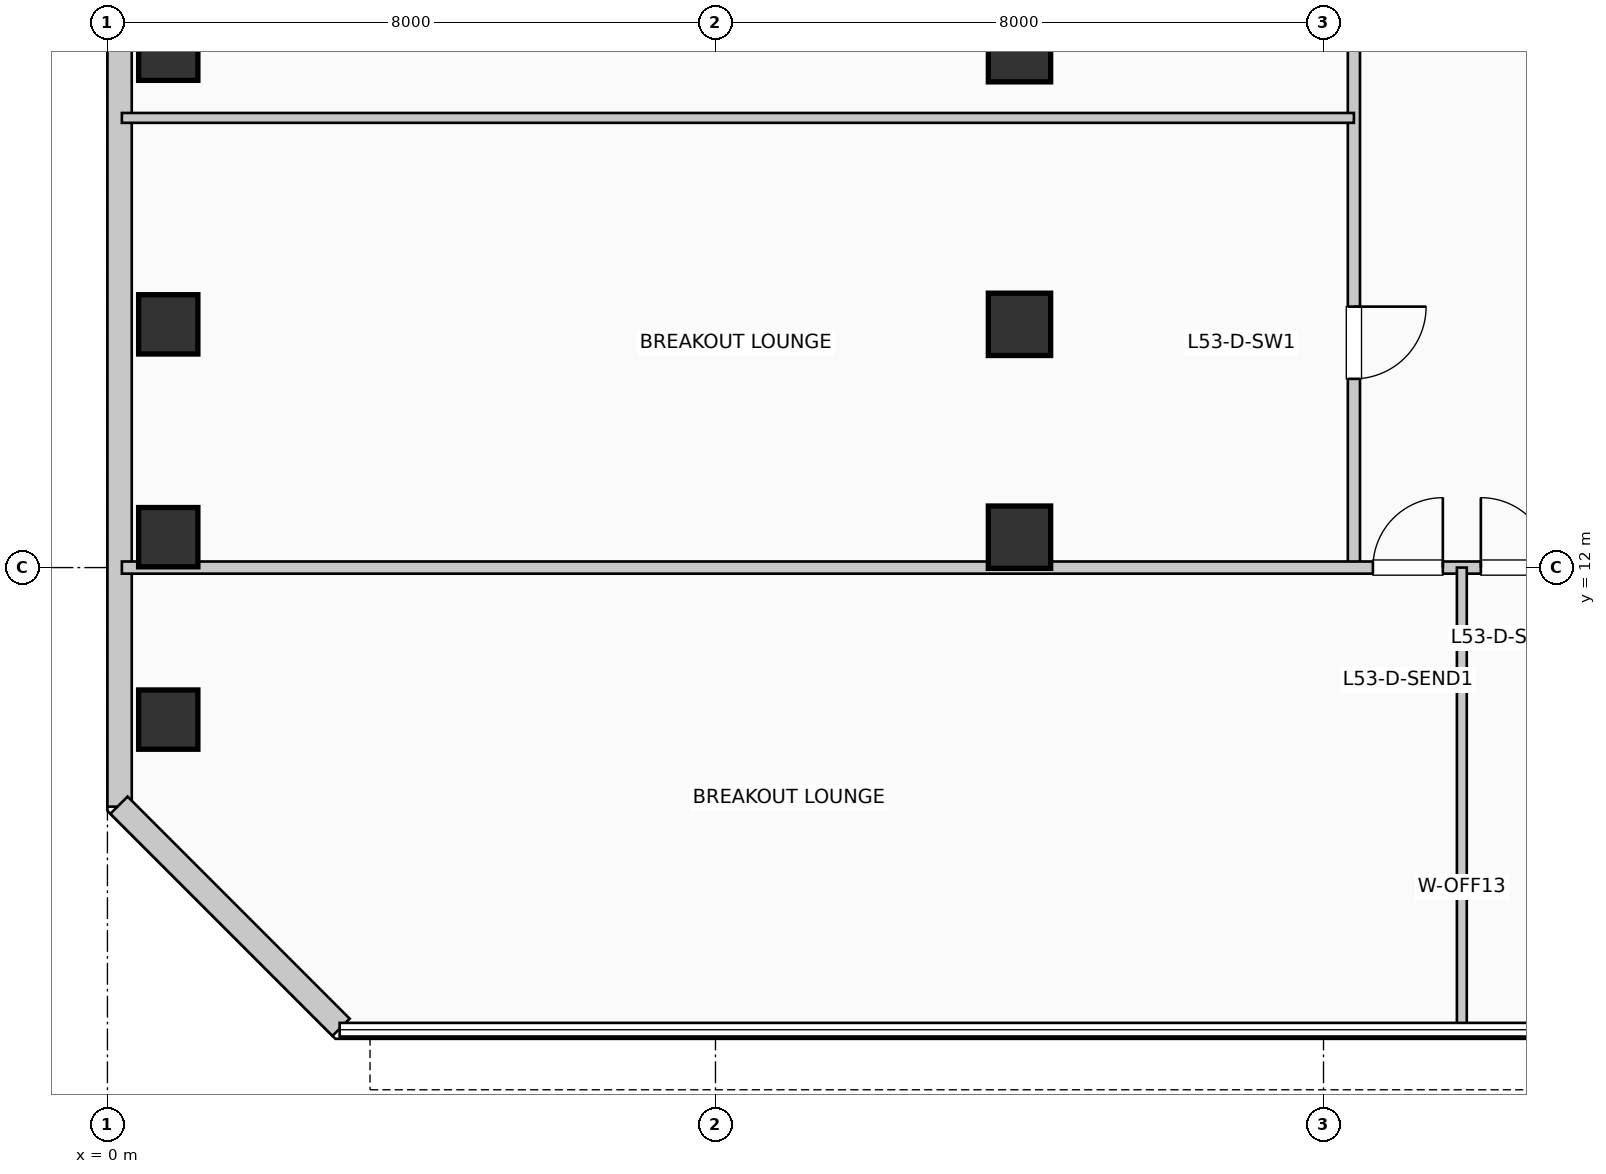
"""IFC4 building model, lengths in metres.
Left out: names, types, materials, properties, quantities, classifications, styles, units other than length and angle.
Written with IfcOpenShell. Run it as: python <this file> out.ifc"""

import sys

from ifc_helpers import new_model, si_unit, direction, frame, frame_2d, origin, origin_2d, place, context, subcontext, project, spatial, rectangle, extrude, element, fill, save


model = new_model("IFC4")
c1 = context("Model", 3, precision=1e-05, world=origin(), true_north=direction((0.0, 1.0)))
c2 = subcontext(c1, "Body", "Model", "MODEL_VIEW")
j1 = project(units=[si_unit("LENGTHUNIT", "METRE"), si_unit("PLANEANGLEUNIT", "RADIAN")], contexts=[c1])
p1 = place(None, origin())
s1 = spatial("IfcSite", under=j1, at=p1, CompositionType="ELEMENT")
p2 = place(p1, origin())
s2 = spatial("IfcBuilding", under=s1, at=p2, CompositionType="ELEMENT")
p3 = place(p2, frame((0.0, 0.0, 219.78)))
s3 = spatial("IfcBuildingStorey", under=s2, at=p3, CompositionType="ELEMENT", Elevation=219.78)
for number, where, z_axis, x_axis in (
    (1, (0.8, 10.0, 0.0), (0.0, 0.0, 1.0), (1.0, 0.0, 0.0)),
    (2, (0.8, 12.4, 0.0), (0.0, 0.0, 1.0), (1.0, 0.0, 0.0)),
    (3, (0.8, 15.2, 0.0), (0.0, 0.0, 1.0), (1.0, 0.0, 0.0)),
    (4, (0.8, 18.8, 0.0), (0.0, 0.0, 1.0), (1.0, 0.0, 0.0)),
):
    element("IfcColumn", number, at=place(p3, frame(where, z_axis=z_axis, x_axis=x_axis)), inside=s3, PredefinedType="COLUMN", context=c2, shape_type="SweptSolid", body=[
        extrude(rectangle(XDim=0.78, YDim=0.78, at=origin_2d()), origin(), (0.0, 0.0, 1.0), 3.96),
    ])
for number, where, z_axis, x_axis in (
    (5, (12.0, 12.4, 0.0), (0.0, 0.0, 1.0), (1.0, 0.0, 0.0)),
    (6, (12.0, 15.2, 0.0), (0.0, 0.0, 1.0), (1.0, 0.0, 0.0)),
    (7, (12.0, 18.8, 0.0), (0.0, 0.0, 1.0), (1.0, 0.0, 0.0)),
):
    element("IfcColumn", number, at=place(p3, frame(where, z_axis=z_axis, x_axis=x_axis)), inside=s3, PredefinedType="COLUMN", context=c2, shape_type="SweptSolid", body=[
        extrude(rectangle(XDim=0.82, YDim=0.82, at=origin_2d()), origin(), (0.0, 0.0, 1.0), 3.96),
    ])
p4 = place(p3, frame((0.16, 34.395, 0.0), z_axis=(0.0, 0.0, 1.0), x_axis=(0.0, -1.0, 0.0)))
e8 = element("IfcWall", 8, at=p4, inside=s3, PredefinedType="SOLIDWALL", context=c2, shape_type="SweptSolid", body=[
    extrude(rectangle(XDim=25.54, YDim=0.32, at=frame_2d((12.77, 0.0))), origin(), (0.0, 0.0, 1.0), 3.71),
])
p5 = place(p3, frame((0.152, 8.874, 0.0), z_axis=(0.0, 0.0, 1.0), x_axis=(0.707077242712, -0.707136318428, 0.0)))
e9 = element("IfcWall", 9, at=p5, inside=s3, PredefinedType="SOLIDWALL", context=c2, shape_type="SweptSolid", body=[
    extrude(rectangle(XDim=4.133, YDim=0.32, at=frame_2d((2.066, 0.0))), origin(), (0.0, 0.0, 1.0), 3.71),
])
p6 = place(p3, frame((16.4, 12.0, 0.0), z_axis=(0.0, 0.0, 1.0), x_axis=(0.0, 1.0, 0.0)))
e10 = element("IfcWall", 10, at=p6, inside=s3, PredefinedType="PARTITIONING", context=c2, shape_type="SweptSolid", body=[
    extrude(rectangle(XDim=17.4, YDim=0.16, at=frame_2d((8.7, 0.0))), origin(), (0.0, 0.0, 1.0), 3.71),
])
p7 = place(p6, frame((3.433, 0.0, 0.0), z_axis=(0.0, 0.0, 1.0), x_axis=(-1.0, 0.0, 0.0)))
e11 = element("IfcOpeningElement", 11, at=p7, cuts=e10, PredefinedType="OPENING", context=c2, shape_type="SweptSolid", body=[
    extrude(rectangle(XDim=0.95, YDim=2.15, at=frame_2d((0.475, 1.075))), frame((0.0, 0.09, 0.0), z_axis=(0.0, -1.0, 0.0), x_axis=(1.0, 0.0, 0.0)), (0.0, 0.0, 1.0), 0.18),
])
p8 = place(p6, frame((9.349, 0.0, 0.0), z_axis=(0.0, 0.0, 1.0), x_axis=(-1.0, 0.0, 0.0)))
e12 = element("IfcOpeningElement", 12, at=p8, cuts=e10, PredefinedType="OPENING", context=c2, shape_type="SweptSolid", body=[
    extrude(rectangle(XDim=0.95, YDim=2.15, at=frame_2d((0.475, 1.075))), frame((0.0, 0.09, 0.0), z_axis=(0.0, -1.0, 0.0), x_axis=(1.0, 0.0, 0.0)), (0.0, 0.0, 1.0), 0.18),
])
p9 = place(p6, frame((15.091, 0.0, 0.0), z_axis=(0.0, 0.0, 1.0), x_axis=(-1.0, 0.0, 0.0)))
e13 = element("IfcOpeningElement", 13, at=p9, cuts=e10, PredefinedType="OPENING", context=c2, shape_type="SweptSolid", body=[
    extrude(rectangle(XDim=0.95, YDim=2.15, at=frame_2d((0.475, 1.075))), frame((0.0, 0.09, 0.0), z_axis=(0.0, -1.0, 0.0), x_axis=(1.0, 0.0, 0.0)), (0.0, 0.0, 1.0), 0.18),
])
p10 = place(p3, frame((0.19, 12.0, 0.0), z_axis=(0.0, 0.0, 1.0), x_axis=(1.0, 0.0, 0.0)))
e14 = element("IfcWall", 14, at=p10, inside=s3, PredefinedType="PARTITIONING", context=c2, shape_type="SweptSolid", body=[
    extrude(rectangle(XDim=23.26, YDim=0.16, at=frame_2d((11.63, 0.0))), origin(), (0.0, 0.0, 1.0), 3.095),
])
p11 = place(p10, frame((16.46, 0.0, 0.0)))
e15 = element("IfcOpeningElement", 15, at=p11, cuts=e14, PredefinedType="OPENING", context=c2, shape_type="SweptSolid", body=[
    extrude(rectangle(XDim=0.92, YDim=2.1, at=frame_2d((0.46, 1.05))), frame((0.0, 0.09, 0.0), z_axis=(0.0, -1.0, 0.0), x_axis=(1.0, 0.0, 0.0)), (0.0, 0.0, 1.0), 0.18),
])
p12 = place(p10, frame((17.88, 0.0, 0.0)))
e16 = element("IfcOpeningElement", 16, at=p12, cuts=e14, PredefinedType="OPENING", context=c2, shape_type="SweptSolid", body=[
    extrude(rectangle(XDim=0.92, YDim=2.1, at=frame_2d((0.46, 1.05))), frame((0.0, 0.09, 0.0), z_axis=(0.0, -1.0, 0.0), x_axis=(1.0, 0.0, 0.0)), (0.0, 0.0, 1.0), 0.18),
])
p13 = place(p3, frame((17.82, 5.99, 0.0), z_axis=(0.0, 0.0, 1.0), x_axis=(0.0, 1.0, 0.0)))
e17 = element("IfcWall", 17, at=p13, inside=s3, PredefinedType="PARTITIONING", context=c2, shape_type="SweptSolid", body=[
    extrude(rectangle(XDim=6.01, YDim=0.13, at=frame_2d((3.005, 0.0))), origin(), (0.0, 0.0, 1.0), 3.71),
])
p14 = place(p3, frame((0.19, 17.916, 0.0), z_axis=(0.0, 0.0, 1.0), x_axis=(1.0, 0.0, 0.0)))
e18 = element("IfcWall", 18, at=p14, inside=s3, PredefinedType="PARTITIONING", context=c2, shape_type="SweptSolid", body=[
    extrude(rectangle(XDim=16.21, YDim=0.13, at=frame_2d((8.105, 0.0))), origin(), (0.0, 0.0, 1.0), 3.71),
])
p15 = place(p11, origin())
e19 = element("IfcDoor", 19, at=p15, inside=s3, OperationType="SINGLE_SWING_RIGHT", PredefinedType="DOOR", context=c2, shape_type="SweptSolid", body=[
    extrude(rectangle(XDim=0.92, YDim=2.1, at=frame_2d((0.46, 1.05))), frame((0.0, 0.025, 0.0), z_axis=(0.0, -1.0, 0.0), x_axis=(1.0, 0.0, 0.0)), (0.0, 0.0, 1.0), 0.05),
])
fill(e15, e19)
p16 = place(p12, origin())
e20 = element("IfcDoor", 20, at=p16, inside=s3, OperationType="SINGLE_SWING_LEFT", PredefinedType="DOOR", context=c2, shape_type="SweptSolid", body=[
    extrude(rectangle(XDim=0.92, YDim=2.1, at=frame_2d((0.46, 1.05))), frame((0.0, 0.025, 0.0), z_axis=(0.0, -1.0, 0.0), x_axis=(1.0, 0.0, 0.0)), (0.0, 0.0, 1.0), 0.05),
])
fill(e16, e20)
p17 = place(p7, origin())
e21 = element("IfcDoor", 21, at=p17, inside=s3, OperationType="SINGLE_SWING_RIGHT", PredefinedType="DOOR", context=c2, shape_type="SweptSolid", body=[
    extrude(rectangle(XDim=0.95, YDim=2.15, at=frame_2d((0.475, 1.075))), frame((0.0, 0.025, 0.0), z_axis=(0.0, -1.0, 0.0), x_axis=(1.0, 0.0, 0.0)), (0.0, 0.0, 1.0), 0.05),
])
fill(e11, e21)
save(model, sys.argv[1])
